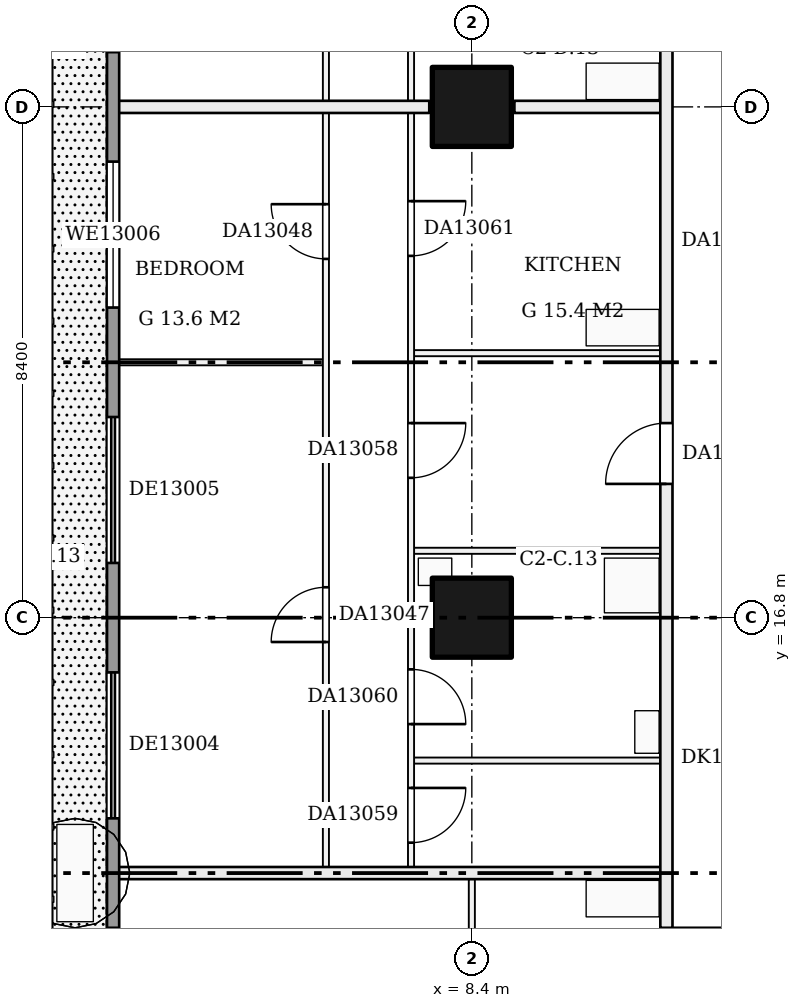
"""IFC4 building model, lengths in metres.
Left out: names, types, materials, properties, quantities, classifications, styles, units other than length and angle.
Written with IfcOpenShell. Run it as: python <this file> out.ifc"""

import sys

from ifc_helpers import new_model, si_unit, direction, frame, frame_2d, origin, origin_2d, place, context, subcontext, project, spatial, rectangle, extrude, element, fill, save


model = new_model("IFC4")
c1 = context("Model", 3, precision=1e-05, world=origin(), true_north=direction((0.0, 1.0)))
c2 = subcontext(c1, "Body", "Model", "MODEL_VIEW")
j1 = project(units=[si_unit("LENGTHUNIT", "METRE"), si_unit("PLANEANGLEUNIT", "RADIAN")], contexts=[c1])
p1 = place(None, origin())
s1 = spatial("IfcSite", under=j1, at=p1, CompositionType="ELEMENT")
p2 = place(p1, origin())
s2 = spatial("IfcBuilding", under=s1, at=p2, CompositionType="ELEMENT")
p3 = place(p2, frame((0.0, 0.0, 56.7)))
s3 = spatial("IfcBuildingStorey", under=s2, at=p3, CompositionType="ELEMENT", Elevation=56.7)
for number, where, z_axis, x_axis in (
    (1, (8.4, 16.8, 0.0), (0.0, 0.0, 1.0), (1.0, 0.0, 0.0)),
    (2, (8.4, 25.2, 0.0), (0.0, 0.0, 1.0), (1.0, 0.0, 0.0)),
):
    element("IfcColumn", number, at=place(p3, frame(where, z_axis=z_axis, x_axis=x_axis)), inside=s3, PredefinedType="COLUMN", context=c2, shape_type="SweptSolid", body=[
        extrude(rectangle(XDim=1.3, YDim=1.3, at=origin_2d()), origin(), (0.0, 0.0, 1.0), 3.22),
    ])
p4 = place(p3, frame((11.5, 11.6, 0.0), z_axis=(0.0, 0.0, 1.0), x_axis=(1.0, 0.0, 0.0)))
e3 = element("IfcWall", 3, at=p4, inside=s3, PredefinedType="PARTITIONING", context=c2, shape_type="SweptSolid", body=[
    extrude(rectangle(XDim=30.5, YDim=0.2, at=frame_2d((15.25, 0.0))), origin(), (0.0, 0.0, 1.0), 3.22),
])
p5 = place(p4, frame((1.626, 0.0, 0.0)))
e4 = element("IfcOpeningElement", 4, at=p5, cuts=e3, PredefinedType="OPENING", context=c2, shape_type="SweptSolid", body=[
    extrude(rectangle(XDim=1.0, YDim=2.1, at=frame_2d((0.5, 1.05))), frame((0.0, 0.11, 0.0), z_axis=(0.0, -1.0, 0.0), x_axis=(1.0, 0.0, 0.0)), (0.0, 0.0, 1.0), 0.22),
])
p6 = place(p4, frame((11.933, 0.0, 0.0)))
e5 = element("IfcOpeningElement", 5, at=p6, cuts=e3, PredefinedType="OPENING", context=c2, shape_type="SweptSolid", body=[
    extrude(rectangle(XDim=1.0, YDim=2.1, at=frame_2d((0.5, 1.05))), frame((0.0, 0.11, 0.0), z_axis=(0.0, -1.0, 0.0), x_axis=(1.0, 0.0, 0.0)), (0.0, 0.0, 1.0), 0.22),
])
p7 = place(p4, frame((17.3, 0.0, 0.0)))
e6 = element("IfcOpeningElement", 6, at=p7, cuts=e3, PredefinedType="OPENING", context=c2, shape_type="SweptSolid", body=[
    extrude(rectangle(XDim=1.0, YDim=2.1, at=frame_2d((0.5, 1.05))), frame((0.0, 0.11, 0.0), z_axis=(0.0, -1.0, 0.0), x_axis=(1.0, 0.0, 0.0)), (0.0, 0.0, 1.0), 0.22),
])
p8 = place(p4, frame((26.8, 0.0, 0.0)))
e7 = element("IfcOpeningElement", 7, at=p8, cuts=e3, PredefinedType="OPENING", context=c2, shape_type="SweptSolid", body=[
    extrude(rectangle(XDim=1.0, YDim=2.1, at=frame_2d((0.5, 1.05))), frame((0.0, 0.11, 0.0), z_axis=(0.0, -1.0, 0.0), x_axis=(1.0, 0.0, 0.0)), (0.0, 0.0, 1.0), 0.22),
])
p9 = place(p3, frame((2.5, 12.6, 0.0), z_axis=(0.0, 0.0, 1.0), x_axis=(1.0, 0.0, 0.0)))
e8 = element("IfcWall", 8, at=p9, inside=s3, PredefinedType="PARTITIONING", context=c2, shape_type="SweptSolid", body=[
    extrude(rectangle(XDim=9.0, YDim=0.2, at=frame_2d((4.5, 0.0))), origin(), (0.0, 0.0, 1.0), 3.22),
])
for number, where, z_axis, x_axis in (
    (9, (7.45, 14.45, 0.0), (0.0, 0.0, 1.0), (1.0, 0.0, 0.0)),
    (10, (7.45, 17.9, 0.0), (0.0, 0.0, 1.0), (1.0, 0.0, 0.0)),
):
    element("IfcWall", number, at=place(p3, frame(where, z_axis=z_axis, x_axis=x_axis)), inside=s3, PredefinedType="PARTITIONING", context=c2, shape_type="SweptSolid", body=[
        extrude(rectangle(XDim=4.05, YDim=0.1, at=frame_2d((2.025, 0.0))), origin(), (0.0, 0.0, 1.0), 3.22),
    ])
p10 = place(p3, frame((2.5, 21.0, 0.0), z_axis=(0.0, 0.0, 1.0), x_axis=(1.0, 0.0, 0.0)))
e11 = element("IfcWall", 11, at=p10, inside=s3, PredefinedType="PARTITIONING", context=c2, shape_type="SweptSolid", body=[
    extrude(rectangle(XDim=3.45, YDim=0.1, at=frame_2d((1.725, 0.0))), origin(), (0.0, 0.0, 1.0), 3.22),
])
p11 = place(p3, frame((7.45, 21.15, 0.0), z_axis=(0.0, 0.0, 1.0), x_axis=(1.0, 0.0, 0.0)))
e12 = element("IfcWall", 12, at=p11, inside=s3, PredefinedType="PARTITIONING", context=c2, shape_type="SweptSolid", body=[
    extrude(rectangle(XDim=4.05, YDim=0.1, at=frame_2d((2.025, 0.0))), origin(), (0.0, 0.0, 1.0), 3.22),
])
p12 = place(p3, frame((2.5, 25.2, 0.0), z_axis=(0.0, 0.0, 1.0), x_axis=(1.0, 0.0, 0.0)))
e13 = element("IfcWall", 13, at=p12, inside=s3, PredefinedType="PARTITIONING", context=c2, shape_type="SweptSolid", body=[
    extrude(rectangle(XDim=5.2, YDim=0.2, at=frame_2d((2.6, 0.0))), origin(), (0.0, 0.0, 1.0), 3.22),
])
p13 = place(p3, frame((9.1, 25.2, 0.0), z_axis=(0.0, 0.0, 1.0), x_axis=(1.0, 0.0, 0.0)))
e14 = element("IfcWall", 14, at=p13, inside=s3, PredefinedType="PARTITIONING", context=c2, shape_type="SweptSolid", body=[
    extrude(rectangle(XDim=2.4, YDim=0.2, at=frame_2d((1.2, 0.0))), origin(), (0.0, 0.0, 1.0), 3.22),
])
p14 = place(p3, frame((6.0, 12.7, 0.0), z_axis=(0.0, 0.0, 1.0), x_axis=(0.0, 1.0, 0.0)))
e15 = element("IfcWall", 15, at=p14, inside=s3, PredefinedType="PARTITIONING", context=c2, shape_type="SweptSolid", body=[
    extrude(rectangle(XDim=29.2, YDim=0.1, at=frame_2d((14.6, 0.0))), origin(), (0.0, 0.0, 1.0), 3.22),
])
p15 = place(p14, frame((3.7, 0.0, 0.0)))
e16 = element("IfcOpeningElement", 16, at=p15, cuts=e15, PredefinedType="OPENING", context=c2, shape_type="SweptSolid", body=[
    extrude(rectangle(XDim=0.9, YDim=2.1, at=frame_2d((0.45, 1.05))), frame((0.0, 0.06, 0.0), z_axis=(0.0, -1.0, 0.0), x_axis=(1.0, 0.0, 0.0)), (0.0, 0.0, 1.0), 0.12),
])
p16 = place(p14, frame((10.0, 0.0, 0.0)))
e17 = element("IfcOpeningElement", 17, at=p16, cuts=e15, PredefinedType="OPENING", context=c2, shape_type="SweptSolid", body=[
    extrude(rectangle(XDim=0.9, YDim=2.1, at=frame_2d((0.45, 1.05))), frame((0.0, 0.06, 0.0), z_axis=(0.0, -1.0, 0.0), x_axis=(1.0, 0.0, 0.0)), (0.0, 0.0, 1.0), 0.12),
])
p17 = place(p14, frame((14.1, 0.0, 0.0)))
e18 = element("IfcOpeningElement", 18, at=p17, cuts=e15, PredefinedType="OPENING", context=c2, shape_type="SweptSolid", body=[
    extrude(rectangle(XDim=0.9, YDim=2.1, at=frame_2d((0.45, 1.05))), frame((0.0, 0.06, 0.0), z_axis=(0.0, -1.0, 0.0), x_axis=(1.0, 0.0, 0.0)), (0.0, 0.0, 1.0), 0.12),
])
p18 = place(p14, frame((18.3, 0.0, 0.0)))
e19 = element("IfcOpeningElement", 19, at=p18, cuts=e15, PredefinedType="OPENING", context=c2, shape_type="SweptSolid", body=[
    extrude(rectangle(XDim=0.9, YDim=2.1, at=frame_2d((0.45, 1.05))), frame((0.0, 0.06, 0.0), z_axis=(0.0, -1.0, 0.0), x_axis=(1.0, 0.0, 0.0)), (0.0, 0.0, 1.0), 0.12),
])
p19 = place(p14, frame((22.5, 0.0, 0.0)))
e20 = element("IfcOpeningElement", 20, at=p19, cuts=e15, PredefinedType="OPENING", context=c2, shape_type="SweptSolid", body=[
    extrude(rectangle(XDim=0.9, YDim=2.1, at=frame_2d((0.45, 1.05))), frame((0.0, 0.06, 0.0), z_axis=(0.0, -1.0, 0.0), x_axis=(1.0, 0.0, 0.0)), (0.0, 0.0, 1.0), 0.12),
])
p20 = place(p14, frame((26.7, 0.0, 0.0)))
e21 = element("IfcOpeningElement", 21, at=p20, cuts=e15, PredefinedType="OPENING", context=c2, shape_type="SweptSolid", body=[
    extrude(rectangle(XDim=0.9, YDim=2.1, at=frame_2d((0.45, 1.05))), frame((0.0, 0.06, 0.0), z_axis=(0.0, -1.0, 0.0), x_axis=(1.0, 0.0, 0.0)), (0.0, 0.0, 1.0), 0.12),
])
p21 = place(p3, frame((7.4, 12.7, 0.0), z_axis=(0.0, 0.0, 1.0), x_axis=(0.0, 1.0, 0.0)))
e22 = element("IfcWall", 22, at=p21, inside=s3, PredefinedType="PARTITIONING", context=c2, shape_type="SweptSolid", body=[
    extrude(rectangle(XDim=20.8, YDim=0.1, at=frame_2d((10.4, 0.0))), origin(), (0.0, 0.0, 1.0), 3.22),
])
p22 = place(p21, frame((6.4, 0.0, 0.0)))
e23 = element("IfcOpeningElement", 23, at=p22, cuts=e22, PredefinedType="OPENING", context=c2, shape_type="SweptSolid", body=[
    extrude(rectangle(XDim=0.9, YDim=2.1, at=frame_2d((0.45, 1.05))), frame((0.0, 0.06, 0.0), z_axis=(0.0, -1.0, 0.0), x_axis=(1.0, 0.0, 0.0)), (0.0, 0.0, 1.0), 0.12),
])
p23 = place(p21, frame((0.4, 0.0, 0.0)))
e24 = element("IfcOpeningElement", 24, at=p23, cuts=e22, PredefinedType="OPENING", context=c2, shape_type="SweptSolid", body=[
    extrude(rectangle(XDim=0.9, YDim=2.1, at=frame_2d((0.45, 1.05))), frame((0.0, 0.06, 0.0), z_axis=(0.0, -1.0, 0.0), x_axis=(1.0, 0.0, 0.0)), (0.0, 0.0, 1.0), 0.12),
])
p24 = place(p21, frame((2.35, 0.0, 0.0)))
e25 = element("IfcOpeningElement", 25, at=p24, cuts=e22, PredefinedType="OPENING", context=c2, shape_type="SweptSolid", body=[
    extrude(rectangle(XDim=0.9, YDim=2.1, at=frame_2d((0.45, 1.05))), frame((0.0, 0.06, 0.0), z_axis=(0.0, -1.0, 0.0), x_axis=(1.0, 0.0, 0.0)), (0.0, 0.0, 1.0), 0.12),
])
p25 = place(p21, frame((10.05, 0.0, 0.0)))
e26 = element("IfcOpeningElement", 26, at=p25, cuts=e22, PredefinedType="OPENING", context=c2, shape_type="SweptSolid", body=[
    extrude(rectangle(XDim=0.9, YDim=2.1, at=frame_2d((0.45, 1.05))), frame((0.0, 0.06, 0.0), z_axis=(0.0, -1.0, 0.0), x_axis=(1.0, 0.0, 0.0)), (0.0, 0.0, 1.0), 0.12),
])
p26 = place(p21, frame((16.567, 0.0, 0.0)))
e27 = element("IfcOpeningElement", 27, at=p26, cuts=e22, PredefinedType="OPENING", context=c2, shape_type="SweptSolid", body=[
    extrude(rectangle(XDim=0.9, YDim=2.1, at=frame_2d((0.45, 1.05))), frame((0.0, 0.06, 0.0), z_axis=(0.0, -1.0, 0.0), x_axis=(1.0, 0.0, 0.0)), (0.0, 0.0, 1.0), 0.12),
])
p27 = place(p21, frame((13.7, 0.0, 0.0)))
e28 = element("IfcOpeningElement", 28, at=p27, cuts=e22, PredefinedType="OPENING", context=c2, shape_type="SweptSolid", body=[
    extrude(rectangle(XDim=0.9, YDim=2.1, at=frame_2d((0.45, 1.05))), frame((0.0, 0.06, 0.0), z_axis=(0.0, -1.0, 0.0), x_axis=(1.0, 0.0, 0.0)), (0.0, 0.0, 1.0), 0.12),
])
p28 = place(p21, frame((19.133, 0.0, 0.0)))
e29 = element("IfcOpeningElement", 29, at=p28, cuts=e22, PredefinedType="OPENING", context=c2, shape_type="SweptSolid", body=[
    extrude(rectangle(XDim=0.9, YDim=2.1, at=frame_2d((0.45, 1.05))), frame((0.0, 0.06, 0.0), z_axis=(0.0, -1.0, 0.0), x_axis=(1.0, 0.0, 0.0)), (0.0, 0.0, 1.0), 0.12),
])
p29 = place(p3, frame((8.4, 9.1, 0.0), z_axis=(0.0, 0.0, 1.0), x_axis=(0.0, 1.0, 0.0)))
e30 = element("IfcWall", 30, at=p29, inside=s3, PredefinedType="PARTITIONING", context=c2, shape_type="SweptSolid", body=[
    extrude(rectangle(XDim=3.4, YDim=0.1, at=frame_2d((1.7, 0.0))), origin(), (0.0, 0.0, 1.0), 3.22),
])
p30 = place(p3, frame((11.6, 11.7, 0.0), z_axis=(0.0, 0.0, 1.0), x_axis=(0.0, 1.0, 0.0)))
e31 = element("IfcWall", 31, at=p30, inside=s3, PredefinedType="PARTITIONING", context=c2, shape_type="SweptSolid", body=[
    extrude(rectangle(XDim=30.3, YDim=0.2, at=frame_2d((15.15, 0.0))), origin(), (0.0, 0.0, 1.0), 3.22),
])
p31 = place(p30, frame((7.3, 0.0, 0.0)))
e32 = element("IfcOpeningElement", 32, at=p31, cuts=e31, PredefinedType="OPENING", context=c2, shape_type="SweptSolid", body=[
    extrude(rectangle(XDim=1.0, YDim=2.1, at=frame_2d((0.5, 1.05))), frame((0.0, 0.11, 0.0), z_axis=(0.0, -1.0, 0.0), x_axis=(1.0, 0.0, 0.0)), (0.0, 0.0, 1.0), 0.22),
])
p32 = place(p30, frame((17.467, 0.0, 0.0)))
e33 = element("IfcOpeningElement", 33, at=p32, cuts=e31, PredefinedType="OPENING", context=c2, shape_type="SweptSolid", body=[
    extrude(rectangle(XDim=1.0, YDim=2.1, at=frame_2d((0.5, 1.05))), frame((0.0, 0.11, 0.0), z_axis=(0.0, -1.0, 0.0), x_axis=(1.0, 0.0, 0.0)), (0.0, 0.0, 1.0), 0.22),
])
p33 = place(p30, frame((28.533, 0.0, 0.0)))
e34 = element("IfcOpeningElement", 34, at=p33, cuts=e31, PredefinedType="OPENING", context=c2, shape_type="SweptSolid", body=[
    extrude(rectangle(XDim=1.0, YDim=2.1, at=frame_2d((0.5, 1.05))), frame((0.0, 0.11, 0.0), z_axis=(0.0, -1.0, 0.0), x_axis=(1.0, 0.0, 0.0)), (0.0, 0.0, 1.0), 0.22),
])
p34 = place(p3, frame((2.5, 53.8, 0.0), z_axis=(0.0, 0.0, 1.0), x_axis=(0.0, -1.0, 0.0)))
e35 = element("IfcWall", 35, at=p34, inside=s3, PredefinedType="SOLIDWALL", context=c2, shape_type="SweptSolid", body=[
    extrude(rectangle(XDim=48.8, YDim=0.2, at=frame_2d((24.4, 0.0))), origin(), (0.0, 0.0, 1.0), 3.22),
])
p35 = place(p34, frame((46.1, 0.0, 0.0)))
e36 = element("IfcOpeningElement", 36, at=p35, cuts=e35, PredefinedType="OPENING", context=c2, shape_type="SweptSolid", body=[
    extrude(rectangle(XDim=2.4, YDim=2.2, at=frame_2d((1.2, 1.1))), frame((0.0, 0.11, 0.0), z_axis=(0.0, -1.0, 0.0), x_axis=(1.0, 0.0, 0.0)), (0.0, 0.0, 1.0), 0.22),
])
p36 = place(p34, frame((42.1, 0.0, 0.0)))
e37 = element("IfcOpeningElement", 37, at=p36, cuts=e35, PredefinedType="OPENING", context=c2, shape_type="SweptSolid", body=[
    extrude(rectangle(XDim=2.4, YDim=2.2, at=frame_2d((1.2, 1.1))), frame((0.0, 0.11, 0.0), z_axis=(0.0, -1.0, 0.0), x_axis=(1.0, 0.0, 0.0)), (0.0, 0.0, 1.0), 0.22),
])
p37 = place(p34, frame((37.9, 0.0, 0.0)))
e38 = element("IfcOpeningElement", 38, at=p37, cuts=e35, PredefinedType="OPENING", context=c2, shape_type="SweptSolid", body=[
    extrude(rectangle(XDim=2.4, YDim=2.2, at=frame_2d((1.2, 1.1))), frame((0.0, 0.11, 0.0), z_axis=(0.0, -1.0, 0.0), x_axis=(1.0, 0.0, 0.0)), (0.0, 0.0, 1.0), 0.22),
])
p38 = place(p34, frame((33.7, 0.0, 0.0)))
e39 = element("IfcOpeningElement", 39, at=p38, cuts=e35, PredefinedType="OPENING", context=c2, shape_type="SweptSolid", body=[
    extrude(rectangle(XDim=2.4, YDim=2.2, at=frame_2d((1.2, 1.1))), frame((0.0, 0.11, 0.0), z_axis=(0.0, -1.0, 0.0), x_axis=(1.0, 0.0, 0.0)), (0.0, 0.0, 1.0), 0.22),
])
p39 = place(p34, frame((29.5, 0.0, 0.9)))
e40 = element("IfcOpeningElement", 40, at=p39, cuts=e35, PredefinedType="OPENING", context=c2, shape_type="SweptSolid", body=[
    extrude(rectangle(XDim=2.4, YDim=1.5, at=frame_2d((1.2, 0.75))), frame((0.0, 0.11, 0.0), z_axis=(0.0, -1.0, 0.0), x_axis=(1.0, 0.0, 0.0)), (0.0, 0.0, 1.0), 0.22),
])
p40 = place(p34, frame((25.3, 0.0, 0.0)))
e41 = element("IfcOpeningElement", 41, at=p40, cuts=e35, PredefinedType="OPENING", context=c2, shape_type="SweptSolid", body=[
    extrude(rectangle(XDim=2.4, YDim=2.2, at=frame_2d((1.2, 1.1))), frame((0.0, 0.11, 0.0), z_axis=(0.0, -1.0, 0.0), x_axis=(1.0, 0.0, 0.0)), (0.0, 0.0, 1.0), 0.22),
])
p41 = place(p34, frame((21.1, 0.0, 0.9)))
e42 = element("IfcOpeningElement", 42, at=p41, cuts=e35, PredefinedType="OPENING", context=c2, shape_type="SweptSolid", body=[
    extrude(rectangle(XDim=2.4, YDim=1.5, at=frame_2d((1.2, 0.75))), frame((0.0, 0.11, 0.0), z_axis=(0.0, -1.0, 0.0), x_axis=(1.0, 0.0, 0.0)), (0.0, 0.0, 1.0), 0.22),
])
p42 = place(p34, frame((16.9, 0.0, 0.0)))
e43 = element("IfcOpeningElement", 43, at=p42, cuts=e35, PredefinedType="OPENING", context=c2, shape_type="SweptSolid", body=[
    extrude(rectangle(XDim=2.4, YDim=2.2, at=frame_2d((1.2, 1.1))), frame((0.0, 0.11, 0.0), z_axis=(0.0, -1.0, 0.0), x_axis=(1.0, 0.0, 0.0)), (0.0, 0.0, 1.0), 0.22),
])
p43 = place(p34, frame((12.7, 0.0, 0.9)))
e44 = element("IfcOpeningElement", 44, at=p43, cuts=e35, PredefinedType="OPENING", context=c2, shape_type="SweptSolid", body=[
    extrude(rectangle(XDim=2.4, YDim=1.5, at=frame_2d((1.2, 0.75))), frame((0.0, 0.11, 0.0), z_axis=(0.0, -1.0, 0.0), x_axis=(1.0, 0.0, 0.0)), (0.0, 0.0, 1.0), 0.22),
])
p44 = place(p34, frame((8.5, 0.0, 0.9)))
e45 = element("IfcOpeningElement", 45, at=p44, cuts=e35, PredefinedType="OPENING", context=c2, shape_type="SweptSolid", body=[
    extrude(rectangle(XDim=2.4, YDim=1.5, at=frame_2d((1.2, 0.75))), frame((0.0, 0.11, 0.0), z_axis=(0.0, -1.0, 0.0), x_axis=(1.0, 0.0, 0.0)), (0.0, 0.0, 1.0), 0.22),
])
p45 = place(p34, frame((4.3, 0.0, 0.0)))
e46 = element("IfcOpeningElement", 46, at=p45, cuts=e35, PredefinedType="OPENING", context=c2, shape_type="SweptSolid", body=[
    extrude(rectangle(XDim=2.4, YDim=2.2, at=frame_2d((1.2, 1.1))), frame((0.0, 0.11, 0.0), z_axis=(0.0, -1.0, 0.0), x_axis=(1.0, 0.0, 0.0)), (0.0, 0.0, 1.0), 0.22),
])
p46 = place(p34, frame((0.3, 0.0, 0.9)))
e47 = element("IfcOpeningElement", 47, at=p46, cuts=e35, PredefinedType="OPENING", context=c2, shape_type="SweptSolid", body=[
    extrude(rectangle(XDim=2.4, YDim=1.5, at=frame_2d((1.2, 0.75))), frame((0.0, 0.11, 0.0), z_axis=(0.0, -1.0, 0.0), x_axis=(1.0, 0.0, 0.0)), (0.0, 0.0, 1.0), 0.22),
])
p47 = place(p15, origin())
e48 = element("IfcDoor", 48, at=p47, inside=s3, OperationType="SINGLE_SWING_LEFT", PredefinedType="DOOR", context=c2, shape_type="SweptSolid", body=[
    extrude(rectangle(XDim=0.9, YDim=2.1, at=frame_2d((0.45, 1.05))), frame((0.0, 0.025, 0.0), z_axis=(0.0, -1.0, 0.0), x_axis=(1.0, 0.0, 0.0)), (0.0, 0.0, 1.0), 0.05),
])
fill(e16, e48)
p48 = place(p16, origin())
e49 = element("IfcDoor", 49, at=p48, inside=s3, OperationType="SINGLE_SWING_RIGHT", PredefinedType="DOOR", context=c2, shape_type="SweptSolid", body=[
    extrude(rectangle(XDim=0.9, YDim=2.1, at=frame_2d((0.45, 1.05))), frame((0.0, 0.025, 0.0), z_axis=(0.0, -1.0, 0.0), x_axis=(1.0, 0.0, 0.0)), (0.0, 0.0, 1.0), 0.05),
])
fill(e17, e49)
p49 = place(p22, frame((0.9, 0.0, 0.0), z_axis=(0.0, 0.0, 1.0), x_axis=(-1.0, 0.0, 0.0)))
e50 = element("IfcDoor", 50, at=p49, inside=s3, OperationType="SINGLE_SWING_LEFT", PredefinedType="DOOR", context=c2, shape_type="SweptSolid", body=[
    extrude(rectangle(XDim=0.9, YDim=2.1, at=frame_2d((0.45, 1.05))), frame((0.0, 0.025, 0.0), z_axis=(0.0, -1.0, 0.0), x_axis=(1.0, 0.0, 0.0)), (0.0, 0.0, 1.0), 0.05),
])
fill(e23, e50)
p50 = place(p23, frame((0.9, 0.0, 0.0), z_axis=(0.0, 0.0, 1.0), x_axis=(-1.0, 0.0, 0.0)))
e51 = element("IfcDoor", 51, at=p50, inside=s3, OperationType="SINGLE_SWING_LEFT", PredefinedType="DOOR", context=c2, shape_type="SweptSolid", body=[
    extrude(rectangle(XDim=0.9, YDim=2.1, at=frame_2d((0.45, 1.05))), frame((0.0, 0.025, 0.0), z_axis=(0.0, -1.0, 0.0), x_axis=(1.0, 0.0, 0.0)), (0.0, 0.0, 1.0), 0.05),
])
fill(e24, e51)
p51 = place(p24, frame((0.9, 0.0, 0.0), z_axis=(0.0, 0.0, 1.0), x_axis=(-1.0, 0.0, 0.0)))
e52 = element("IfcDoor", 52, at=p51, inside=s3, OperationType="SINGLE_SWING_RIGHT", PredefinedType="DOOR", context=c2, shape_type="SweptSolid", body=[
    extrude(rectangle(XDim=0.9, YDim=2.1, at=frame_2d((0.45, 1.05))), frame((0.0, 0.025, 0.0), z_axis=(0.0, -1.0, 0.0), x_axis=(1.0, 0.0, 0.0)), (0.0, 0.0, 1.0), 0.05),
])
fill(e25, e52)
p52 = place(p25, frame((0.9, 0.0, 0.0), z_axis=(0.0, 0.0, 1.0), x_axis=(-1.0, 0.0, 0.0)))
e53 = element("IfcDoor", 53, at=p52, inside=s3, OperationType="SINGLE_SWING_LEFT", PredefinedType="DOOR", context=c2, shape_type="SweptSolid", body=[
    extrude(rectangle(XDim=0.9, YDim=2.1, at=frame_2d((0.45, 1.05))), frame((0.0, 0.025, 0.0), z_axis=(0.0, -1.0, 0.0), x_axis=(1.0, 0.0, 0.0)), (0.0, 0.0, 1.0), 0.05),
])
fill(e26, e53)
p53 = place(p31, origin())
e54 = element("IfcDoor", 54, at=p53, inside=s3, OperationType="SINGLE_SWING_LEFT", PredefinedType="DOOR", context=c2, shape_type="SweptSolid", body=[
    extrude(rectangle(XDim=1.0, YDim=2.1, at=frame_2d((0.5, 1.05))), frame((0.0, 0.025, 0.0), z_axis=(0.0, -1.0, 0.0), x_axis=(1.0, 0.0, 0.0)), (0.0, 0.0, 1.0), 0.05),
])
fill(e32, e54)
p54 = place(p37, origin())
e55 = element("IfcDoor", 55, at=p54, inside=s3, OperationType="DOUBLE_DOOR_SLIDING", PredefinedType="DOOR", context=c2, shape_type="SweptSolid", body=[
    extrude(rectangle(XDim=2.4, YDim=2.2, at=frame_2d((1.2, 1.1))), frame((0.0, 0.025, 0.0), z_axis=(0.0, -1.0, 0.0), x_axis=(1.0, 0.0, 0.0)), (0.0, 0.0, 1.0), 0.05),
])
fill(e38, e55)
p55 = place(p38, origin())
e56 = element("IfcDoor", 56, at=p55, inside=s3, OperationType="DOUBLE_DOOR_SLIDING", PredefinedType="DOOR", context=c2, shape_type="SweptSolid", body=[
    extrude(rectangle(XDim=2.4, YDim=2.2, at=frame_2d((1.2, 1.1))), frame((0.0, 0.025, 0.0), z_axis=(0.0, -1.0, 0.0), x_axis=(1.0, 0.0, 0.0)), (0.0, 0.0, 1.0), 0.05),
])
fill(e39, e56)
p56 = place(p39, origin())
e57 = element("IfcWindow", 57, at=p56, inside=s3, PartitioningType="SINGLE_PANEL", PredefinedType="WINDOW", context=c2, shape_type="SweptSolid", body=[
    extrude(rectangle(XDim=2.4, YDim=1.5, at=frame_2d((1.2, 0.75))), frame((0.0, 0.03, 0.0), z_axis=(0.0, -1.0, 0.0), x_axis=(1.0, 0.0, 0.0)), (0.0, 0.0, 1.0), 0.06),
])
fill(e40, e57)
save(model, sys.argv[1])
